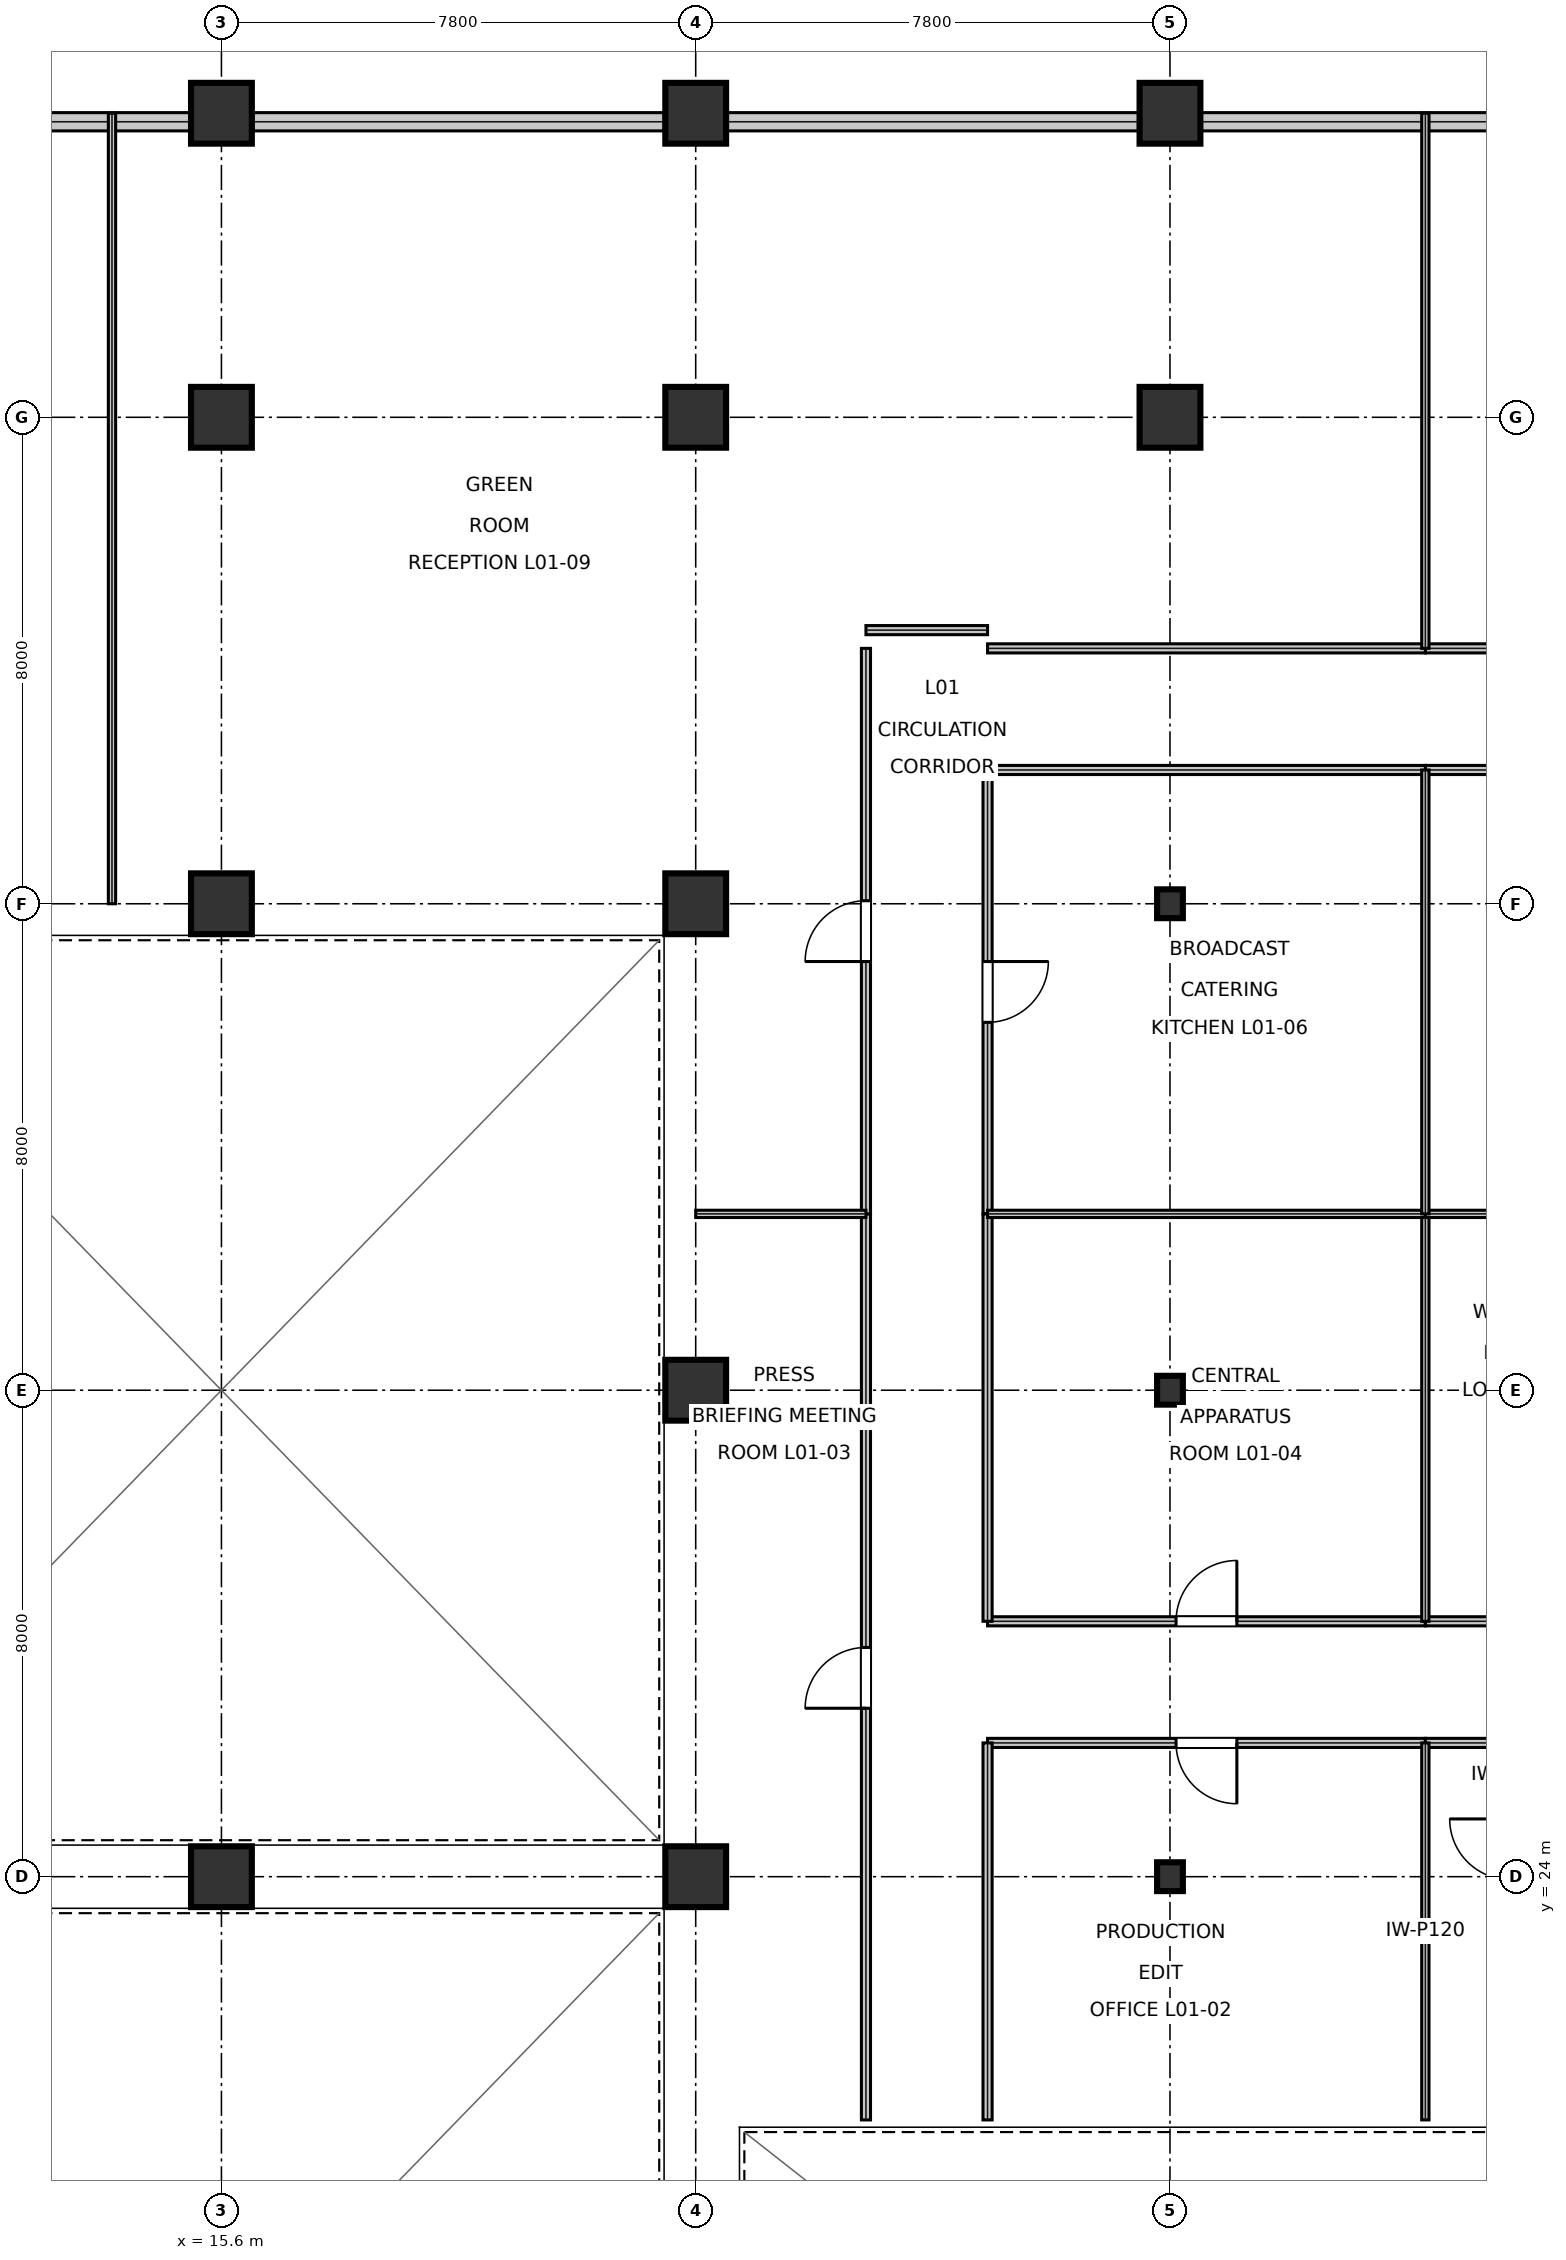
"""IFC4 building model, lengths in metres.
Left out: names, types, materials, properties, quantities, classifications, styles, units other than length and angle.
Written with IfcOpenShell. Run it as: python <this file> out.ifc"""

import sys

from ifc_helpers import new_model, si_unit, direction, frame, frame_2d, origin, origin_2d, place, context, subcontext, project, spatial, rectangle, i_section, extrude, element, fill, save


model = new_model("IFC4")
c1 = context("Model", 3, precision=1e-05, world=origin(), true_north=direction((0.0, 1.0)))
c2 = subcontext(c1, "Body", "Model", "MODEL_VIEW")
j1 = project(units=[si_unit("LENGTHUNIT", "METRE"), si_unit("PLANEANGLEUNIT", "RADIAN")], contexts=[c1])
p1 = place(None, origin())
s1 = spatial("IfcSite", under=j1, at=p1, CompositionType="ELEMENT")
p2 = place(p1, origin())
s2 = spatial("IfcBuilding", under=s1, at=p2, CompositionType="ELEMENT")
p3 = place(p2, frame((0.0, 0.0, 5.4)))
s3 = spatial("IfcBuildingStorey", under=s2, at=p3, CompositionType="ELEMENT", Elevation=5.4)
for number, where, z_axis, x_axis in (
    (1, (15.6, 24.0, 0.0), (0.0, 0.0, 1.0), (1.0, 0.0, 0.0)),
    (2, (15.6, 40.0, 0.0), (0.0, 0.0, 1.0), (1.0, 0.0, 0.0)),
    (3, (15.6, 48.0, 0.0), (0.0, 0.0, 1.0), (1.0, 0.0, 0.0)),
    (4, (15.6, 53.0, 0.0), (0.0, 0.0, 1.0), (1.0, 0.0, 0.0)),
    (5, (23.4, 24.0, 0.0), (0.0, 0.0, 1.0), (1.0, 0.0, 0.0)),
    (6, (23.4, 32.0, 0.0), (0.0, 0.0, 1.0), (1.0, 0.0, 0.0)),
    (7, (23.4, 40.0, 0.0), (0.0, 0.0, 1.0), (1.0, 0.0, 0.0)),
    (8, (23.4, 48.0, 0.0), (0.0, 0.0, 1.0), (1.0, 0.0, 0.0)),
    (9, (23.4, 53.0, 0.0), (0.0, 0.0, 1.0), (1.0, 0.0, 0.0)),
):
    element("IfcColumn", number, at=place(p3, frame(where, z_axis=z_axis, x_axis=x_axis)), inside=s3, PredefinedType="COLUMN", context=c2, shape_type="SweptSolid", body=[
        extrude(rectangle(XDim=1.0, YDim=1.0, at=origin_2d()), origin(), (0.0, 0.0, 1.0), 5.395),
    ])
for number, where, z_axis, x_axis in (
    (10, (31.2, 24.0, 0.0), (0.0, 0.0, 1.0), (1.0, 0.0, 0.0)),
    (11, (31.2, 32.0, 0.0), (0.0, 0.0, 1.0), (1.0, 0.0, 0.0)),
    (12, (31.2, 40.0, 0.0), (0.0, 0.0, 1.0), (1.0, 0.0, 0.0)),
):
    element("IfcColumn", number, at=place(p3, frame(where, z_axis=z_axis, x_axis=x_axis)), inside=s3, PredefinedType="COLUMN", context=c2, shape_type="SweptSolid", body=[
        extrude(i_section(OverallWidth=0.424, OverallDepth=0.474, WebThickness=0.048, FlangeThickness=0.077, at=origin_2d()), origin(), (0.0, 0.0, 1.0), 5.395),
    ])
for number, where, z_axis, x_axis in (
    (13, (31.2, 48.0, 0.0), (0.0, 0.0, 1.0), (1.0, 0.0, 0.0)),
    (14, (31.2, 53.0, 0.0), (0.0, 0.0, 1.0), (1.0, 0.0, 0.0)),
):
    element("IfcColumn", number, at=place(p3, frame(where, z_axis=z_axis, x_axis=x_axis)), inside=s3, PredefinedType="COLUMN", context=c2, shape_type="SweptSolid", body=[
        extrude(rectangle(XDim=1.0, YDim=1.0, at=origin_2d()), origin(), (0.0, 0.0, 1.0), 5.395),
    ])
for number, where, z_axis, x_axis in (
    (15, (38.482, 52.86, 0.0), (0.0, 0.0, 1.0), (-1.0, 0.0, 0.0)),
    (16, (30.682, 52.86, 0.0), (0.0, 0.0, 1.0), (-1.0, 0.0, 0.0)),
):
    element("IfcWall", number, at=place(p3, frame(where, z_axis=z_axis, x_axis=x_axis)), inside=s3, PredefinedType="STANDARD", context=c2, shape_type="SweptSolid", body=[
        extrude(rectangle(XDim=6.764, YDim=0.3, at=frame_2d((3.382, 0.0))), origin(), (0.0, 0.0, 1.0), 4.648),
    ])
p4 = place(p3, frame((22.882, 52.86, 0.0), z_axis=(0.0, 0.0, 1.0), x_axis=(-1.0, 0.0, 0.0)))
e17 = element("IfcWall", 17, at=p4, inside=s3, PredefinedType="STANDARD", context=c2, shape_type="SweptSolid", body=[
    extrude(rectangle(XDim=6.764, YDim=0.3, at=frame_2d((3.382, 0.0))), origin(), (0.0, 0.0, 1.0), 4.648),
])
p5 = place(p3, frame((15.082, 52.86, 0.0), z_axis=(0.0, 0.0, 1.0), x_axis=(-1.0, 0.0, 0.0)))
e18 = element("IfcWall", 18, at=p5, inside=s3, PredefinedType="STANDARD", context=c2, shape_type="SweptSolid", body=[
    extrude(rectangle(XDim=6.764, YDim=0.3, at=frame_2d((3.382, 0.0))), origin(), (0.0, 0.0, 1.0), 4.648),
])
p6 = place(p3, frame((28.2, 26.2, 0.0), z_axis=(0.0, 0.0, 1.0), x_axis=(1.0, 0.0, 0.0)))
e19 = element("IfcWall", 19, at=p6, inside=s3, PredefinedType="PARTITIONING", context=c2, shape_type="SweptSolid", body=[
    extrude(rectangle(XDim=7.2, YDim=0.15, at=frame_2d((3.6, 0.0))), origin(), (0.0, 0.0, 1.0), 4.415),
])
p7 = place(p6, frame((3.1, 0.0, 0.0)))
e20 = element("IfcOpeningElement", 20, at=p7, cuts=e19, PredefinedType="OPENING", context=c2, shape_type="SweptSolid", body=[
    extrude(rectangle(XDim=1.0, YDim=2.15, at=frame_2d((0.5, 1.075))), frame((0.0, 0.085, 0.0), z_axis=(0.0, -1.0, 0.0), x_axis=(1.0, 0.0, 0.0)), (0.0, 0.0, 1.0), 0.17),
])
p8 = place(p3, frame((26.2, 20.0, 0.0), z_axis=(0.0, 0.0, 1.0), x_axis=(0.0, 1.0, 0.0)))
e21 = element("IfcWall", 21, at=p8, inside=s3, PredefinedType="PARTITIONING", context=c2, shape_type="SweptSolid", body=[
    extrude(rectangle(XDim=14.9, YDim=0.15, at=frame_2d((7.45, 0.0))), origin(), (0.0, 0.0, 1.0), 4.338),
])
p9 = place(p8, frame((6.77, 0.0, 0.0)))
e22 = element("IfcOpeningElement", 22, at=p9, cuts=e21, PredefinedType="OPENING", context=c2, shape_type="SweptSolid", body=[
    extrude(rectangle(XDim=1.0, YDim=2.15, at=frame_2d((0.5, 1.075))), frame((0.0, 0.085, 0.0), z_axis=(0.0, -1.0, 0.0), x_axis=(1.0, 0.0, 0.0)), (0.0, 0.0, 1.0), 0.17),
])
p10 = place(p3, frame((28.2, 28.2, 0.0), z_axis=(0.0, 0.0, 1.0), x_axis=(1.0, 0.0, 0.0)))
e23 = element("IfcWall", 23, at=p10, inside=s3, PredefinedType="PARTITIONING", context=c2, shape_type="SweptSolid", body=[
    extrude(rectangle(XDim=7.2, YDim=0.15, at=frame_2d((3.6, 0.0))), origin(), (0.0, 0.0, 1.0), 4.415),
])
p11 = place(p10, frame((3.1, 0.0, 0.0)))
e24 = element("IfcOpeningElement", 24, at=p11, cuts=e23, PredefinedType="OPENING", context=c2, shape_type="SweptSolid", body=[
    extrude(rectangle(XDim=1.0, YDim=2.15, at=frame_2d((0.5, 1.075))), frame((0.0, 0.085, 0.0), z_axis=(0.0, -1.0, 0.0), x_axis=(1.0, 0.0, 0.0)), (0.0, 0.0, 1.0), 0.17),
])
p12 = place(p3, frame((35.4, 28.2, 0.0), z_axis=(0.0, 0.0, 1.0), x_axis=(1.0, 0.0, 0.0)))
e25 = element("IfcWall", 25, at=p12, inside=s3, PredefinedType="PARTITIONING", context=c2, shape_type="SweptSolid", body=[
    extrude(rectangle(XDim=3.4, YDim=0.15, at=frame_2d((1.7, 0.0))), origin(), (0.0, 0.0, 1.0), 5.12),
])
p13 = place(p12, frame((1.92, 0.0, 0.0)))
e26 = element("IfcOpeningElement", 26, at=p13, cuts=e25, PredefinedType="OPENING", context=c2, shape_type="SweptSolid", body=[
    extrude(rectangle(XDim=1.0, YDim=2.15, at=frame_2d((0.5, 1.075))), frame((0.0, 0.085, 0.0), z_axis=(0.0, -1.0, 0.0), x_axis=(1.0, 0.0, 0.0)), (0.0, 0.0, 1.0), 0.17),
])
p14 = place(p3, frame((28.2, 34.9, 0.0), z_axis=(0.0, 0.0, 1.0), x_axis=(0.0, 1.0, 0.0)))
e27 = element("IfcWall", 27, at=p14, inside=s3, PredefinedType="PARTITIONING", context=c2, shape_type="SweptSolid", body=[
    extrude(rectangle(XDim=7.3, YDim=0.15, at=frame_2d((3.65, 0.0))), origin(), (0.0, 0.0, 1.0), 4.338),
])
p15 = place(p14, frame((3.15, 0.0, 0.0)))
e28 = element("IfcOpeningElement", 28, at=p15, cuts=e27, PredefinedType="OPENING", context=c2, shape_type="SweptSolid", body=[
    extrude(rectangle(XDim=1.0, YDim=2.15, at=frame_2d((0.5, 1.075))), frame((0.0, 0.085, 0.0), z_axis=(0.0, -1.0, 0.0), x_axis=(1.0, 0.0, 0.0)), (0.0, 0.0, 1.0), 0.17),
])
p16 = place(p3, frame((35.4, 42.2, 0.0), z_axis=(0.0, 0.0, 1.0), x_axis=(1.0, 0.0, 0.0)))
e29 = element("IfcWall", 29, at=p16, inside=s3, PredefinedType="PARTITIONING", context=c2, shape_type="SweptSolid", body=[
    extrude(rectangle(XDim=11.4, YDim=0.15, at=frame_2d((5.7, 0.0))), origin(), (0.0, 0.0, 1.0), 4.415),
])
p17 = place(p16, frame((5.2, 0.0, 0.0)))
e30 = element("IfcOpeningElement", 30, at=p17, cuts=e29, PredefinedType="OPENING", context=c2, shape_type="SweptSolid", body=[
    extrude(rectangle(XDim=1.0, YDim=2.15, at=frame_2d((0.5, 1.075))), frame((0.0, 0.085, 0.0), z_axis=(0.0, -1.0, 0.0), x_axis=(1.0, 0.0, 0.0)), (0.0, 0.0, 1.0), 0.17),
])
p18 = place(p3, frame((26.2, 34.9, 0.0), z_axis=(0.0, 0.0, 1.0), x_axis=(0.0, 1.0, 0.0)))
e31 = element("IfcWall", 31, at=p18, inside=s3, PredefinedType="PARTITIONING", context=c2, shape_type="SweptSolid", body=[
    extrude(rectangle(XDim=9.3, YDim=0.15, at=frame_2d((4.65, 0.0))), origin(), (0.0, 0.0, 1.0), 4.338),
])
p19 = place(p18, frame((4.15, 0.0, 0.0)))
e32 = element("IfcOpeningElement", 32, at=p19, cuts=e31, PredefinedType="OPENING", context=c2, shape_type="SweptSolid", body=[
    extrude(rectangle(XDim=1.0, YDim=2.15, at=frame_2d((0.5, 1.075))), frame((0.0, 0.085, 0.0), z_axis=(0.0, -1.0, 0.0), x_axis=(1.0, 0.0, 0.0)), (0.0, 0.0, 1.0), 0.17),
])
p20 = place(p3, frame((35.4, 44.2, 0.0), z_axis=(0.0, 0.0, 1.0), x_axis=(1.0, 0.0, 0.0)))
e33 = element("IfcWall", 33, at=p20, inside=s3, PredefinedType="PARTITIONING", context=c2, shape_type="SweptSolid", body=[
    extrude(rectangle(XDim=11.4, YDim=0.15, at=frame_2d((5.7, 0.0))), origin(), (0.0, 0.0, 1.0), 4.415),
])
p21 = place(p20, frame((5.2, 0.0, 0.0)))
e34 = element("IfcOpeningElement", 34, at=p21, cuts=e33, PredefinedType="OPENING", context=c2, shape_type="SweptSolid", body=[
    extrude(rectangle(XDim=1.0, YDim=2.15, at=frame_2d((0.5, 1.075))), frame((0.0, 0.085, 0.0), z_axis=(0.0, -1.0, 0.0), x_axis=(1.0, 0.0, 0.0)), (0.0, 0.0, 1.0), 0.17),
])
p22 = place(p3, frame((35.4, 26.2, 0.0), z_axis=(0.0, 0.0, 1.0), x_axis=(1.0, 0.0, 0.0)))
e35 = element("IfcWall", 35, at=p22, inside=s3, PredefinedType="PARTITIONING", context=c2, shape_type="SweptSolid", body=[
    extrude(rectangle(XDim=1.4, YDim=0.15, at=frame_2d((0.7, 0.0))), origin(), (0.0, 0.0, 1.0), 5.12),
])
p23 = place(p3, frame((28.2, 20.0, 0.0), z_axis=(0.0, 0.0, 1.0), x_axis=(0.0, 1.0, 0.0)))
e36 = element("IfcWall", 36, at=p23, inside=s3, PredefinedType="PARTITIONING", context=c2, shape_type="SweptSolid", body=[
    extrude(rectangle(XDim=6.2, YDim=0.15, at=frame_2d((3.1, 0.0))), origin(), (0.0, 0.0, 1.0), 4.338),
])
p24 = place(p3, frame((28.2, 28.2, 0.0), z_axis=(0.0, 0.0, 1.0), x_axis=(0.0, 1.0, 0.0)))
e37 = element("IfcWall", 37, at=p24, inside=s3, PredefinedType="PARTITIONING", context=c2, shape_type="SweptSolid", body=[
    extrude(rectangle(XDim=6.7, YDim=0.15, at=frame_2d((3.35, 0.0))), origin(), (0.0, 0.0, 1.0), 4.338),
])
for number, where, z_axis, x_axis in (
    (38, (28.2, 42.2, 0.0), (0.0, 0.0, 1.0), (1.0, 0.0, 0.0)),
    (39, (28.2, 44.2, 0.0), (0.0, 0.0, 1.0), (1.0, 0.0, 0.0)),
):
    element("IfcWall", number, at=place(p3, frame(where, z_axis=z_axis, x_axis=x_axis)), inside=s3, PredefinedType="PARTITIONING", context=c2, shape_type="SweptSolid", body=[
        extrude(rectangle(XDim=7.2, YDim=0.15, at=frame_2d((3.6, 0.0))), origin(), (0.0, 0.0, 1.0), 4.415),
    ])
p25 = place(p3, frame((26.2, 44.5, 0.0), z_axis=(0.0, 0.0, 1.0), x_axis=(1.0, 0.0, 0.0)))
e40 = element("IfcWall", 40, at=p25, inside=s3, PredefinedType="PARTITIONING", context=c2, shape_type="SweptSolid", body=[
    extrude(rectangle(XDim=2.0, YDim=0.15, at=frame_2d((1.0, 0.0))), origin(), (0.0, 0.0, 1.0), 4.701),
])
p26 = place(p3, frame((35.4, 20.0, 0.0), z_axis=(0.0, 0.0, 1.0), x_axis=(0.0, 1.0, 0.0)))
e41 = element("IfcWall", 41, at=p26, inside=s3, PredefinedType="PARTITIONING", context=c2, shape_type="SweptSolid", body=[
    extrude(rectangle(XDim=6.2, YDim=0.12, at=frame_2d((3.1, 0.0))), origin(), (0.0, 0.0, 1.0), 4.338),
])
p27 = place(p3, frame((13.8, 40.0, 0.0), z_axis=(0.0, 0.0, 1.0), x_axis=(0.0, 1.0, 0.0)))
e42 = element("IfcWall", 42, at=p27, inside=s3, PredefinedType="PARTITIONING", context=c2, shape_type="SweptSolid", body=[
    extrude(rectangle(XDim=13.0, YDim=0.12, at=frame_2d((6.5, 0.0))), origin(), (0.0, 0.0, 1.0), 4.338),
])
p28 = place(p3, frame((23.4, 34.9, 0.0), z_axis=(0.0, 0.0, 1.0), x_axis=(1.0, 0.0, 0.0)))
e43 = element("IfcWall", 43, at=p28, inside=s3, PredefinedType="PARTITIONING", context=c2, shape_type="SweptSolid", body=[
    extrude(rectangle(XDim=2.8, YDim=0.12, at=frame_2d((1.4, 0.0))), origin(), (0.0, 0.0, 1.0), 5.12),
])
p29 = place(p3, frame((35.4, 28.2, 0.0), z_axis=(0.0, 0.0, 1.0), x_axis=(0.0, 1.0, 0.0)))
e44 = element("IfcWall", 44, at=p29, inside=s3, PredefinedType="PARTITIONING", context=c2, shape_type="SweptSolid", body=[
    extrude(rectangle(XDim=6.7, YDim=0.12, at=frame_2d((3.35, 0.0))), origin(), (0.0, 0.0, 1.0), 4.338),
])
p30 = place(p3, frame((28.2, 34.9, 0.0), z_axis=(0.0, 0.0, 1.0), x_axis=(1.0, 0.0, 0.0)))
e45 = element("IfcWall", 45, at=p30, inside=s3, PredefinedType="PARTITIONING", context=c2, shape_type="SweptSolid", body=[
    extrude(rectangle(XDim=7.2, YDim=0.12, at=frame_2d((3.6, 0.0))), origin(), (0.0, 0.0, 1.0), 4.415),
])
p31 = place(p3, frame((35.4, 34.9, 0.0), z_axis=(0.0, 0.0, 1.0), x_axis=(1.0, 0.0, 0.0)))
e46 = element("IfcWall", 46, at=p31, inside=s3, PredefinedType="PARTITIONING", context=c2, shape_type="SweptSolid", body=[
    extrude(rectangle(XDim=4.7, YDim=0.12, at=frame_2d((2.35, 0.0))), origin(), (0.0, 0.0, 1.0), 4.415),
])
p32 = place(p3, frame((35.4, 34.9, 0.0), z_axis=(0.0, 0.0, 1.0), x_axis=(0.0, 1.0, 0.0)))
e47 = element("IfcWall", 47, at=p32, inside=s3, PredefinedType="PARTITIONING", context=c2, shape_type="SweptSolid", body=[
    extrude(rectangle(XDim=7.3, YDim=0.12, at=frame_2d((3.65, 0.0))), origin(), (0.0, 0.0, 1.0), 4.338),
])
p33 = place(p3, frame((35.4, 44.2, 0.0), z_axis=(0.0, 0.0, 1.0), x_axis=(0.0, 1.0, 0.0)))
e48 = element("IfcWall", 48, at=p33, inside=s3, PredefinedType="PARTITIONING", context=c2, shape_type="SweptSolid", body=[
    extrude(rectangle(XDim=8.8, YDim=0.12, at=frame_2d((4.4, 0.0))), origin(), (0.0, 0.0, 1.0), 4.338),
])
p34 = place(p7, frame((1.0, 0.0, 0.0), z_axis=(0.0, 0.0, 1.0), x_axis=(-1.0, 0.0, 0.0)))
e49 = element("IfcDoor", 49, at=p34, inside=s3, OperationType="SINGLE_SWING_LEFT", PredefinedType="DOOR", context=c2, shape_type="SweptSolid", body=[
    extrude(rectangle(XDim=1.0, YDim=2.15, at=frame_2d((0.5, 1.075))), frame((0.0, 0.025, 0.0), z_axis=(0.0, -1.0, 0.0), x_axis=(1.0, 0.0, 0.0)), (0.0, 0.0, 1.0), 0.05),
])
fill(e20, e49)
p35 = place(p9, origin())
e50 = element("IfcDoor", 50, at=p35, inside=s3, OperationType="SINGLE_SWING_LEFT", PredefinedType="DOOR", context=c2, shape_type="SweptSolid", body=[
    extrude(rectangle(XDim=1.0, YDim=2.15, at=frame_2d((0.5, 1.075))), frame((0.0, 0.025, 0.0), z_axis=(0.0, -1.0, 0.0), x_axis=(1.0, 0.0, 0.0)), (0.0, 0.0, 1.0), 0.05),
])
fill(e22, e50)
p36 = place(p11, origin())
e51 = element("IfcDoor", 51, at=p36, inside=s3, OperationType="SINGLE_SWING_RIGHT", PredefinedType="DOOR", context=c2, shape_type="SweptSolid", body=[
    extrude(rectangle(XDim=1.0, YDim=2.15, at=frame_2d((0.5, 1.075))), frame((0.0, 0.025, 0.0), z_axis=(0.0, -1.0, 0.0), x_axis=(1.0, 0.0, 0.0)), (0.0, 0.0, 1.0), 0.05),
])
fill(e24, e51)
p37 = place(p15, frame((1.0, 0.0, 0.0), z_axis=(0.0, 0.0, 1.0), x_axis=(-1.0, 0.0, 0.0)))
e52 = element("IfcDoor", 52, at=p37, inside=s3, OperationType="SINGLE_SWING_LEFT", PredefinedType="DOOR", context=c2, shape_type="SweptSolid", body=[
    extrude(rectangle(XDim=1.0, YDim=2.15, at=frame_2d((0.5, 1.075))), frame((0.0, 0.025, 0.0), z_axis=(0.0, -1.0, 0.0), x_axis=(1.0, 0.0, 0.0)), (0.0, 0.0, 1.0), 0.05),
])
fill(e28, e52)
p38 = place(p19, origin())
e53 = element("IfcDoor", 53, at=p38, inside=s3, OperationType="SINGLE_SWING_LEFT", PredefinedType="DOOR", context=c2, shape_type="SweptSolid", body=[
    extrude(rectangle(XDim=1.0, YDim=2.15, at=frame_2d((0.5, 1.075))), frame((0.0, 0.025, 0.0), z_axis=(0.0, -1.0, 0.0), x_axis=(1.0, 0.0, 0.0)), (0.0, 0.0, 1.0), 0.05),
])
fill(e32, e53)
save(model, sys.argv[1])
